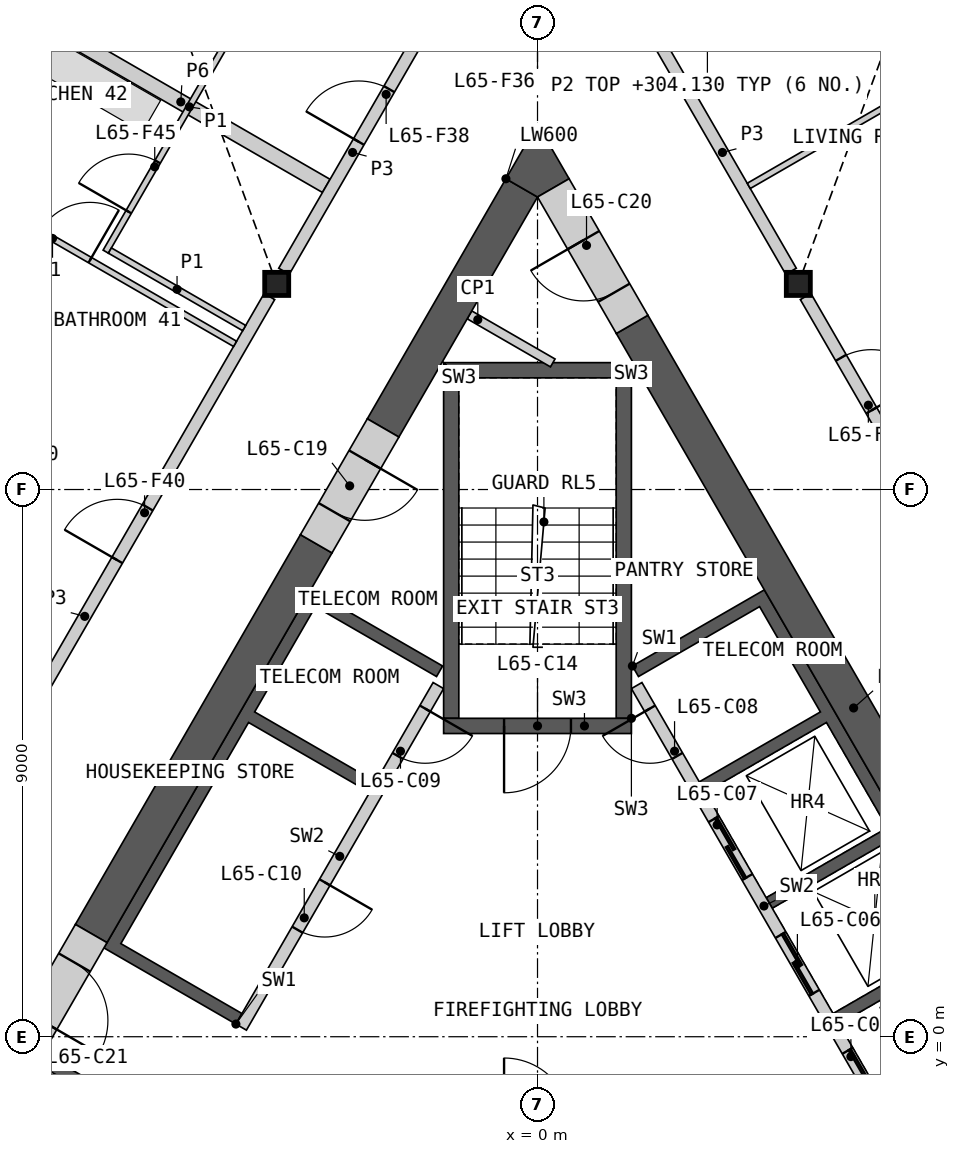
"""IFC4 building model, lengths in metres.
Left out: names, types, materials, properties, quantities, classifications, styles, units other than length and angle.
Written with IfcOpenShell. Run it as: python <this file> out.ifc"""

import sys

from ifc_helpers import new_model, si_unit, direction, frame, frame_2d, origin, origin_2d, place, context, subcontext, project, spatial, polyline, rectangle, i_section, outline, extrude, element, fill, save


model = new_model("IFC4")
c1 = context("Model", 3, precision=1e-05, world=origin(), true_north=direction((0.0, 1.0)))
c2 = subcontext(c1, "Body", "Model", "MODEL_VIEW")
j1 = project(units=[si_unit("LENGTHUNIT", "METRE"), si_unit("PLANEANGLEUNIT", "RADIAN")], contexts=[c1])
p1 = place(None, origin())
s1 = spatial("IfcSite", under=j1, at=p1, CompositionType="ELEMENT")
p2 = place(p1, origin())
s2 = spatial("IfcBuilding", under=s1, at=p2, CompositionType="ELEMENT")
p3 = place(p2, frame((0.0, 0.0, 301.8)))
s3 = spatial("IfcBuildingStorey", under=s2, at=p3, CompositionType="ELEMENT", Elevation=301.8)
for number, where, z_axis, x_axis in (
    (1, (-4.289, 12.382, 0.0), (0.0, 0.0, 1.0), (1.0, 0.0, 0.0)),
    (2, (4.289, 12.382, 0.0), (0.0, 0.0, 1.0), (1.0, 0.0, 0.0)),
):
    element("IfcColumn", number, at=place(p3, frame(where, z_axis=z_axis, x_axis=x_axis)), inside=s3, PredefinedType="COLUMN", context=c2, shape_type="SweptSolid", body=[
        extrude(i_section(OverallWidth=0.396, OverallDepth=0.381, WebThickness=0.019, FlangeThickness=0.03, at=origin_2d()), origin(), (0.0, 0.0, 1.0), 3.4),
    ])
p4 = place(p3, origin())
e3 = element("IfcWall", 3, at=p4, inside=s3, PredefinedType="SHEAR", context=c2, shape_type="SweptSolid", body=[
    extrude(outline(polyline([(1.561, 6.097), (3.731, 7.35), (8.231, -0.444), (6.061, -1.697), (5.96, -1.524), (7.952, -0.374), (6.952, 1.358), (4.96, 0.208), (4.861, 0.381), (6.852, 1.531), (5.852, 3.263), (3.861, 2.113), (3.76, 2.287), (5.752, 3.437), (4.752, 5.169), (2.76, 4.019), (2.66, 4.192), (4.652, 5.342), (3.652, 7.074), (1.66, 5.924), (1.561, 6.097)])), origin(), (0.0, 0.0, 1.0), 3.1),
])
p5 = place(p3, frame((5.817, -1.476, 0.0), z_axis=(0.0, 0.0, 1.0), x_axis=(-0.500002616675, 0.866023893041, 0.0)))
e4 = element("IfcWall", 4, at=p5, inside=s3, PredefinedType="SOLIDWALL", context=c2, shape_type="SweptSolid", body=[
    extrude(rectangle(XDim=8.373, YDim=0.2, at=frame_2d((4.187, 0.0))), origin(), (0.0, 0.0, 1.0), 3.1),
])
p6 = place(p5, frame((0.337, 0.0, 0.0)))
e5 = element("IfcOpeningElement", 5, at=p6, cuts=e4, PredefinedType="OPENING", context=c2, shape_type="SweptSolid", body=[
    extrude(rectangle(XDim=1.1, YDim=2.1, at=frame_2d((0.55, 1.05))), frame((0.0, 0.11, 0.0), z_axis=(0.0, -1.0, 0.0), x_axis=(1.0, 0.0, 0.0)), (0.0, 0.0, 1.0), 0.22),
])
p7 = place(p5, frame((2.537, 0.0, 0.0)))
e6 = element("IfcOpeningElement", 6, at=p7, cuts=e4, PredefinedType="OPENING", context=c2, shape_type="SweptSolid", body=[
    extrude(rectangle(XDim=1.1, YDim=2.1, at=frame_2d((0.55, 1.05))), frame((0.0, 0.11, 0.0), z_axis=(0.0, -1.0, 0.0), x_axis=(1.0, 0.0, 0.0)), (0.0, 0.0, 1.0), 0.22),
])
p8 = place(p5, frame((4.737, 0.0, 0.0)))
e7 = element("IfcOpeningElement", 7, at=p8, cuts=e4, PredefinedType="OPENING", context=c2, shape_type="SweptSolid", body=[
    extrude(rectangle(XDim=1.1, YDim=2.1, at=frame_2d((0.55, 1.05))), frame((0.0, 0.11, 0.0), z_axis=(0.0, -1.0, 0.0), x_axis=(1.0, 0.0, 0.0)), (0.0, 0.0, 1.0), 0.22),
])
p9 = place(p5, frame((7.037, 0.0, 0.0)))
e8 = element("IfcOpeningElement", 8, at=p9, cuts=e4, PredefinedType="OPENING", context=c2, shape_type="SweptSolid", body=[
    extrude(rectangle(XDim=0.9, YDim=2.1, at=frame_2d((0.45, 1.05))), frame((0.0, 0.11, 0.0), z_axis=(0.0, -1.0, 0.0), x_axis=(1.0, 0.0, 0.0)), (0.0, 0.0, 1.0), 0.22),
])
p10 = place(p3, origin())
e9 = element("IfcWall", 9, at=p10, inside=s3, PredefinedType="SHEAR", context=c2, shape_type="SweptSolid", body=[
    extrude(outline(polyline([(-6.061, -1.697), (-8.231, -0.444), (-8.131, -0.271), (-5.96, -1.524), (-6.061, -1.697)])), origin(), (0.0, 0.0, 1.0), 3.1),
])
p11 = place(p3, origin())
e10 = element("IfcWall", 10, at=p11, inside=s3, PredefinedType="SHEAR", context=c2, shape_type="SweptSolid", body=[
    extrude(outline(polyline([(-4.96, 0.208), (-7.131, 1.461), (-3.731, 7.35), (-1.561, 6.097), (-1.66, 5.924), (-3.652, 7.074), (-4.652, 5.342), (-2.66, 4.192), (-2.76, 4.019), (-4.752, 5.169), (-6.852, 1.531), (-4.861, 0.381), (-4.96, 0.208)])), origin(), (0.0, 0.0, 1.0), 3.1),
])
p12 = place(p3, frame((-1.631, 5.776, 0.0), z_axis=(0.0, 0.0, 1.0), x_axis=(-0.499992876559, -0.866029516466, 0.0)))
e11 = element("IfcWall", 11, at=p12, inside=s3, PredefinedType="SOLIDWALL", context=c2, shape_type="SweptSolid", body=[
    extrude(rectangle(XDim=6.486, YDim=0.2, at=frame_2d((3.243, 0.0))), origin(), (0.0, 0.0, 1.0), 3.1),
])
p13 = place(p12, frame((0.437, 0.0, 0.0)))
e12 = element("IfcOpeningElement", 12, at=p13, cuts=e11, PredefinedType="OPENING", context=c2, shape_type="SweptSolid", body=[
    extrude(rectangle(XDim=0.9, YDim=2.1, at=frame_2d((0.45, 1.05))), frame((0.0, 0.11, 0.0), z_axis=(0.0, -1.0, 0.0), x_axis=(1.0, 0.0, 0.0)), (0.0, 0.0, 1.0), 0.22),
])
p14 = place(p12, frame((3.737, 0.0, 0.0)))
e13 = element("IfcOpeningElement", 13, at=p14, cuts=e11, PredefinedType="OPENING", context=c2, shape_type="SweptSolid", body=[
    extrude(rectangle(XDim=0.9, YDim=2.1, at=frame_2d((0.45, 1.05))), frame((0.0, 0.11, 0.0), z_axis=(0.0, -1.0, 0.0), x_axis=(1.0, 0.0, 0.0)), (0.0, 0.0, 1.0), 0.22),
])
p15 = place(p3, origin())
e14 = element("IfcWall", 14, at=p15, inside=s3, PredefinedType="SHEAR", context=c2, shape_type="SweptSolid", body=[
    extrude(outline(polyline([(1.544, 5.237), (1.544, 11.087), (1.294, 10.837), (1.294, 5.237), (1.544, 5.237)])), origin(), (0.0, 0.0, 1.0), 3.1),
])
p16 = place(p3, origin())
e15 = element("IfcWall", 15, at=p16, inside=s3, PredefinedType="SHEAR", context=c2, shape_type="SweptSolid", body=[
    extrude(outline(polyline([(1.544, 11.087), (-1.544, 11.087), (-1.294, 10.837), (1.294, 10.837), (1.544, 11.087)])), origin(), (0.0, 0.0, 1.0), 3.1),
])
p17 = place(p3, origin())
e16 = element("IfcWall", 16, at=p17, inside=s3, PredefinedType="SHEAR", context=c2, shape_type="SweptSolid", body=[
    extrude(outline(polyline([(-1.294, 10.837), (-1.544, 11.087), (-1.544, 5.237), (-1.294, 5.237), (-1.294, 10.837)])), origin(), (0.0, 0.0, 1.0), 3.1),
])
p18 = place(p3, frame((1.544, 5.112, 0.0), z_axis=(0.0, 0.0, 1.0), x_axis=(-1.0, 0.0, 0.0)))
e17 = element("IfcWall", 17, at=p18, inside=s3, PredefinedType="SHEAR", context=c2, shape_type="SweptSolid", body=[
    extrude(rectangle(XDim=3.088, YDim=0.25, at=frame_2d((1.544, 0.0))), origin(), (0.0, 0.0, 1.0), 3.1),
])
p19 = place(p18, frame((0.994, 0.0, 0.0)))
e18 = element("IfcOpeningElement", 18, at=p19, cuts=e17, PredefinedType="OPENING", context=c2, shape_type="SweptSolid", body=[
    extrude(rectangle(XDim=1.1, YDim=2.1, at=frame_2d((0.55, 1.05))), frame((0.0, 0.135, 0.0), z_axis=(0.0, -1.0, 0.0), x_axis=(1.0, 0.0, 0.0)), (0.0, 0.0, 1.0), 0.27),
])
p20 = place(p3, frame((-1.119, 11.873, 0.0), z_axis=(0.0, 0.0, 1.0), x_axis=(0.865992812752, -0.500056445075, 0.0)))
e19 = element("IfcWall", 19, at=p20, inside=s3, PredefinedType="PARTITIONING", context=c2, shape_type="SweptSolid", body=[
    extrude(rectangle(XDim=1.582, YDim=0.15, at=frame_2d((0.791, 0.0))), origin(), (0.0, 0.0, 1.0), 3.1),
])
p21 = place(p3, frame((8.841, -0.902, 0.0), z_axis=(0.0, 0.0, 1.0), x_axis=(-0.499995618375, 0.866027933502, 0.0)))
e20 = element("IfcWall", 20, at=p21, inside=s3, PredefinedType="SHEAR", context=c2, shape_type="SweptSolid", body=[
    extrude(rectangle(XDim=14.571, YDim=0.6, at=frame_2d((7.285, 0.0))), origin(), (0.0, 0.0, 1.0), 3.1),
])
p22 = place(p3, frame((-3.639, 8.107, 0.0), z_axis=(0.0, 0.0, 1.0), x_axis=(-0.49999180351, -0.866030135978, 0.0)))
e21 = element("IfcWall", 21, at=p22, inside=s3, PredefinedType="SHEAR", context=c2, shape_type="SweptSolid", body=[
    extrude(rectangle(XDim=7.401, YDim=0.6, at=frame_2d((3.701, 0.0))), origin(), (0.0, 0.0, 1.0), 3.1),
])
p23 = place(p3, frame((-0.26, 13.961, 0.0), z_axis=(0.0, 0.0, 1.0), x_axis=(-0.499980485389, -0.866036670257, 0.0)))
e22 = element("IfcWall", 22, at=p23, inside=s3, PredefinedType="SHEAR", context=c2, shape_type="SweptSolid", body=[
    extrude(rectangle(XDim=4.559, YDim=0.6, at=frame_2d((2.28, 0.0))), origin(), (0.0, 0.0, 1.0), 3.1),
])
p24 = place(p3, origin())
e23 = element("IfcWall", 23, at=p24, inside=s3, PredefinedType="SHEAR", context=c2, shape_type="SweptSolid", body=[
    extrude(outline(polyline([(-0.52, 14.111), (0.0, 15.011), (0.52, 14.111), (0.0, 13.811), (-0.52, 14.111)])), origin(), (0.0, 0.0, 1.0), 3.1),
])
p25 = place(p3, frame((-2.539, 10.013, 0.0), z_axis=(0.0, 0.0, 1.0), x_axis=(-0.50002983664, -0.866008176907, 0.0)))
e24 = element("IfcWall", 24, at=p25, inside=s3, PredefinedType="SHEAR", context=c2, shape_type="SweptSolid", body=[
    extrude(rectangle(XDim=2.2, YDim=0.6, at=frame_2d((1.1, 0.0))), origin(), (0.0, 0.0, 1.0), 3.1),
])
p26 = place(p25, frame((0.6, 0.0, 0.0)))
e25 = element("IfcOpeningElement", 25, at=p26, cuts=e24, PredefinedType="OPENING", context=c2, shape_type="SweptSolid", body=[
    extrude(rectangle(XDim=1.0, YDim=2.1, at=frame_2d((0.5, 1.05))), frame((0.0, 0.31, 0.0), z_axis=(0.0, -1.0, 0.0), x_axis=(1.0, 0.0, 0.0)), (0.0, 0.0, 1.0), 0.62),
])
p27 = place(p3, frame((1.556, 11.716, 0.0), z_axis=(0.0, 0.0, 1.0), x_axis=(-0.500018667571, 0.866014625789, 0.0)))
e26 = element("IfcWall", 26, at=p27, inside=s3, PredefinedType="SHEAR", context=c2, shape_type="SweptSolid", body=[
    extrude(rectangle(XDim=2.592, YDim=0.6, at=frame_2d((1.296, 0.0))), origin(), (0.0, 0.0, 1.0), 3.1),
])
p28 = place(p27, frame((0.6, 0.0, 0.0)))
e27 = element("IfcOpeningElement", 27, at=p28, cuts=e26, PredefinedType="OPENING", context=c2, shape_type="SweptSolid", body=[
    extrude(rectangle(XDim=1.0, YDim=2.1, at=frame_2d((0.5, 1.05))), frame((0.0, 0.31, 0.0), z_axis=(0.0, -1.0, 0.0), x_axis=(1.0, 0.0, 0.0)), (0.0, 0.0, 1.0), 0.62),
])
p29 = place(p3, frame((-7.34, 1.698, 0.0), z_axis=(0.0, 0.0, 1.0), x_axis=(-0.50002983664, -0.866008176907, 0.0)))
e28 = element("IfcWall", 28, at=p29, inside=s3, PredefinedType="SHEAR", context=c2, shape_type="SweptSolid", body=[
    extrude(rectangle(XDim=2.2, YDim=0.6, at=frame_2d((1.1, 0.0))), origin(), (0.0, 0.0, 1.0), 3.1),
])
p30 = place(p29, frame((0.55, 0.0, 0.0)))
e29 = element("IfcOpeningElement", 29, at=p30, cuts=e28, PredefinedType="OPENING", context=c2, shape_type="SweptSolid", body=[
    extrude(rectangle(XDim=1.1, YDim=2.1, at=frame_2d((0.55, 1.05))), frame((0.0, 0.31, 0.0), z_axis=(0.0, -1.0, 0.0), x_axis=(1.0, 0.0, 0.0)), (0.0, 0.0, 1.0), 0.62),
])
p31 = place(p3, frame((4.409, 12.174, 0.0), z_axis=(0.0, 0.0, 1.0), x_axis=(0.499984266882, -0.866034487114, 0.0)))
e30 = element("IfcWall", 30, at=p31, inside=s3, PredefinedType="PARTITIONING", context=c2, shape_type="SweptSolid", body=[
    extrude(rectangle(XDim=8.099, YDim=0.2, at=frame_2d((4.049, 0.0))), origin(), (0.0, 0.0, 1.0), 3.1),
])
p32 = place(p31, frame((5.123, 0.0, 0.0)))
e31 = element("IfcOpeningElement", 31, at=p32, cuts=e30, PredefinedType="OPENING", context=c2, shape_type="SweptSolid", body=[
    extrude(rectangle(XDim=1.0, YDim=2.1, at=frame_2d((0.5, 1.05))), frame((0.0, 0.11, 0.0), z_axis=(0.0, -1.0, 0.0), x_axis=(1.0, 0.0, 0.0)), (0.0, 0.0, 1.0), 0.22),
])
p33 = place(p31, frame((1.164, 0.0, 0.0)))
e32 = element("IfcOpeningElement", 32, at=p33, cuts=e30, PredefinedType="OPENING", context=c2, shape_type="SweptSolid", body=[
    extrude(rectangle(XDim=1.0, YDim=2.1, at=frame_2d((0.5, 1.05))), frame((0.0, 0.11, 0.0), z_axis=(0.0, -1.0, 0.0), x_axis=(1.0, 0.0, 0.0)), (0.0, 0.0, 1.0), 0.22),
])
p34 = place(p3, frame((-8.458, 5.16, 0.0), z_axis=(0.0, 0.0, 1.0), x_axis=(0.499984266882, 0.866034487114, 0.0)))
e33 = element("IfcWall", 33, at=p34, inside=s3, PredefinedType="PARTITIONING", context=c2, shape_type="SweptSolid", body=[
    extrude(rectangle(XDim=8.099, YDim=0.2, at=frame_2d((4.049, 0.0))), origin(), (0.0, 0.0, 1.0), 3.1),
])
p35 = place(p34, frame((3.093, 0.0, 0.0)))
e34 = element("IfcOpeningElement", 34, at=p35, cuts=e33, PredefinedType="OPENING", context=c2, shape_type="SweptSolid", body=[
    extrude(rectangle(XDim=1.0, YDim=2.1, at=frame_2d((0.5, 1.05))), frame((0.0, 0.11, 0.0), z_axis=(0.0, -1.0, 0.0), x_axis=(1.0, 0.0, 0.0)), (0.0, 0.0, 1.0), 0.22),
])
p36 = place(p3, frame((-8.259, 16.756, 0.0), z_axis=(0.0, 0.0, 1.0), x_axis=(0.866023692682, -0.500002963705, 0.0)))
e35 = element("IfcWall", 35, at=p36, inside=s3, PredefinedType="PARTITIONING", context=c2, shape_type="SweptSolid", body=[
    extrude(rectangle(XDim=5.525, YDim=0.25, at=frame_2d((2.762, 0.0))), origin(), (0.0, 0.0, 1.0), 2.33),
])
p37 = place(p3, frame((1.913, 16.498, 0.0), z_axis=(0.0, 0.0, 1.0), x_axis=(0.499950370306, -0.866054055606, 0.0)))
e36 = element("IfcWall", 36, at=p37, inside=s3, PredefinedType="PARTITIONING", context=c2, shape_type="SweptSolid", body=[
    extrude(rectangle(XDim=4.513, YDim=0.2, at=frame_2d((2.256, 0.0))), origin(), (0.0, 0.0, 1.0), 3.1),
])
p38 = place(p3, frame((-4.169, 12.59, 0.0), z_axis=(0.0, 0.0, 1.0), x_axis=(0.499950370306, 0.866054055606, 0.0)))
e37 = element("IfcWall", 37, at=p38, inside=s3, PredefinedType="PARTITIONING", context=c2, shape_type="SweptSolid", body=[
    extrude(rectangle(XDim=4.513, YDim=0.2, at=frame_2d((2.256, 0.0))), origin(), (0.0, 0.0, 1.0), 3.1),
])
p39 = place(p38, frame((2.459, 0.0, 0.0)))
e38 = element("IfcOpeningElement", 38, at=p39, cuts=e37, PredefinedType="OPENING", context=c2, shape_type="SweptSolid", body=[
    extrude(rectangle(XDim=1.0, YDim=2.1, at=frame_2d((0.5, 1.05))), frame((0.0, 0.11, 0.0), z_axis=(0.0, -1.0, 0.0), x_axis=(1.0, 0.0, 0.0)), (0.0, 0.0, 1.0), 0.22),
])
p40 = place(p3, frame((3.474, 13.994, 0.0), z_axis=(0.0, 0.0, 1.0), x_axis=(0.866032424046, 0.499987840353, 0.0)))
e39 = element("IfcWall", 39, at=p40, inside=s3, PredefinedType="PARTITIONING", context=c2, shape_type="SweptSolid", body=[
    extrude(rectangle(XDim=12.635, YDim=0.1, at=frame_2d((6.317, 0.0))), origin(), (0.0, 0.0, 1.0), 2.33),
])
p41 = place(p40, frame((8.714, 0.0, 0.0)))
e40 = element("IfcOpeningElement", 40, at=p41, cuts=e39, PredefinedType="OPENING", context=c2, shape_type="SweptSolid", body=[
    extrude(rectangle(XDim=0.95, YDim=2.1, at=frame_2d((0.475, 1.05))), frame((0.0, 0.06, 0.0), z_axis=(0.0, -1.0, 0.0), x_axis=(1.0, 0.0, 0.0)), (0.0, 0.0, 1.0), 0.12),
])
p42 = place(p3, frame((-9.787, 14.174, 0.0), z_axis=(0.0, 0.0, 1.0), x_axis=(0.866031222068, -0.499989922303, 0.0)))
e41 = element("IfcWall", 41, at=p42, inside=s3, PredefinedType="PARTITIONING", context=c2, shape_type="SweptSolid", body=[
    extrude(rectangle(XDim=5.557, YDim=0.1, at=frame_2d((2.779, 0.0))), origin(), (0.0, 0.0, 1.0), 2.33),
])
p43 = place(p42, frame((1.853, 0.0, 0.0)))
e42 = element("IfcOpeningElement", 42, at=p43, cuts=e41, PredefinedType="OPENING", context=c2, shape_type="SweptSolid", body=[
    extrude(rectangle(XDim=0.95, YDim=2.1, at=frame_2d((0.475, 1.05))), frame((0.0, 0.06, 0.0), z_axis=(0.0, -1.0, 0.0), x_axis=(1.0, 0.0, 0.0)), (0.0, 0.0, 1.0), 0.12),
])
p44 = place(p3, frame((-7.101, 12.912, 0.0), z_axis=(0.0, 0.0, 1.0), x_axis=(0.499996545922, 0.866027397988, 0.0)))
e43 = element("IfcWall", 43, at=p44, inside=s3, PredefinedType="PARTITIONING", context=c2, shape_type="SweptSolid", body=[
    extrude(rectangle(XDim=5.5, YDim=0.1, at=frame_2d((2.75, 0.0))), origin(), (0.0, 0.0, 1.0), 2.33),
])
p45 = place(p44, frame((0.756, 0.0, 0.0)))
e44 = element("IfcOpeningElement", 44, at=p45, cuts=e43, PredefinedType="OPENING", context=c2, shape_type="SweptSolid", body=[
    extrude(rectangle(XDim=0.95, YDim=2.1, at=frame_2d((0.475, 1.05))), frame((0.0, 0.06, 0.0), z_axis=(0.0, -1.0, 0.0), x_axis=(1.0, 0.0, 0.0)), (0.0, 0.0, 1.0), 0.12),
])
p46 = place(p3, frame((-7.032, 12.93, 0.0), z_axis=(0.0, 0.0, 1.0), x_axis=(0.866030925526, -0.499990435942, 0.0)))
e45 = element("IfcWall", 45, at=p46, inside=s3, PredefinedType="PARTITIONING", context=c2, shape_type="SweptSolid", body=[
    extrude(rectangle(XDim=2.55, YDim=0.1, at=frame_2d((1.275, 0.0))), origin(), (0.0, 0.0, 1.0), 2.33),
])
p47 = place(p6, origin())
e46 = element("IfcDoor", 46, at=p47, inside=s3, OperationType="SLIDING_TO_LEFT", PredefinedType="DOOR", context=c2, shape_type="SweptSolid", body=[
    extrude(rectangle(XDim=1.1, YDim=2.1, at=frame_2d((0.55, 1.05))), frame((0.0, 0.025, 0.0), z_axis=(0.0, -1.0, 0.0), x_axis=(1.0, 0.0, 0.0)), (0.0, 0.0, 1.0), 0.05),
])
fill(e5, e46)
p48 = place(p7, origin())
e47 = element("IfcDoor", 47, at=p48, inside=s3, OperationType="SLIDING_TO_LEFT", PredefinedType="DOOR", context=c2, shape_type="SweptSolid", body=[
    extrude(rectangle(XDim=1.1, YDim=2.1, at=frame_2d((0.55, 1.05))), frame((0.0, 0.025, 0.0), z_axis=(0.0, -1.0, 0.0), x_axis=(1.0, 0.0, 0.0)), (0.0, 0.0, 1.0), 0.05),
])
fill(e6, e47)
p49 = place(p8, origin())
e48 = element("IfcDoor", 48, at=p49, inside=s3, OperationType="SLIDING_TO_LEFT", PredefinedType="DOOR", context=c2, shape_type="SweptSolid", body=[
    extrude(rectangle(XDim=1.1, YDim=2.1, at=frame_2d((0.55, 1.05))), frame((0.0, 0.025, 0.0), z_axis=(0.0, -1.0, 0.0), x_axis=(1.0, 0.0, 0.0)), (0.0, 0.0, 1.0), 0.05),
])
fill(e7, e48)
p50 = place(p9, origin())
e49 = element("IfcDoor", 49, at=p50, inside=s3, OperationType="SINGLE_SWING_RIGHT", PredefinedType="DOOR", context=c2, shape_type="SweptSolid", body=[
    extrude(rectangle(XDim=0.9, YDim=2.1, at=frame_2d((0.45, 1.05))), frame((0.0, 0.025, 0.0), z_axis=(0.0, -1.0, 0.0), x_axis=(1.0, 0.0, 0.0)), (0.0, 0.0, 1.0), 0.05),
])
fill(e8, e49)
p51 = place(p13, origin())
e50 = element("IfcDoor", 50, at=p51, inside=s3, OperationType="SINGLE_SWING_LEFT", PredefinedType="DOOR", context=c2, shape_type="SweptSolid", body=[
    extrude(rectangle(XDim=0.9, YDim=2.1, at=frame_2d((0.45, 1.05))), frame((0.0, 0.025, 0.0), z_axis=(0.0, -1.0, 0.0), x_axis=(1.0, 0.0, 0.0)), (0.0, 0.0, 1.0), 0.05),
])
fill(e12, e50)
p52 = place(p14, origin())
e51 = element("IfcDoor", 51, at=p52, inside=s3, OperationType="SINGLE_SWING_LEFT", PredefinedType="DOOR", context=c2, shape_type="SweptSolid", body=[
    extrude(rectangle(XDim=0.9, YDim=2.1, at=frame_2d((0.45, 1.05))), frame((0.0, 0.025, 0.0), z_axis=(0.0, -1.0, 0.0), x_axis=(1.0, 0.0, 0.0)), (0.0, 0.0, 1.0), 0.05),
])
fill(e13, e51)
p53 = place(p19, origin())
e52 = element("IfcDoor", 52, at=p53, inside=s3, OperationType="SINGLE_SWING_RIGHT", PredefinedType="DOOR", context=c2, shape_type="SweptSolid", body=[
    extrude(rectangle(XDim=1.1, YDim=2.1, at=frame_2d((0.55, 1.05))), frame((0.0, 0.025, 0.0), z_axis=(0.0, -1.0, 0.0), x_axis=(1.0, 0.0, 0.0)), (0.0, 0.0, 1.0), 0.05),
])
fill(e18, e52)
p54 = place(p26, origin())
e53 = element("IfcDoor", 53, at=p54, inside=s3, OperationType="SINGLE_SWING_LEFT", PredefinedType="DOOR", context=c2, shape_type="SweptSolid", body=[
    extrude(rectangle(XDim=1.0, YDim=2.1, at=frame_2d((0.5, 1.05))), frame((0.0, 0.055, 0.0), z_axis=(0.0, -1.0, 0.0), x_axis=(1.0, 0.0, 0.0)), (0.0, 0.0, 1.0), 0.05),
])
fill(e25, e53)
p55 = place(p28, origin())
e54 = element("IfcDoor", 54, at=p55, inside=s3, OperationType="SINGLE_SWING_RIGHT", PredefinedType="DOOR", context=c2, shape_type="SweptSolid", body=[
    extrude(rectangle(XDim=1.0, YDim=2.1, at=frame_2d((0.5, 1.05))), frame((0.0, 0.055, 0.0), z_axis=(0.0, -1.0, 0.0), x_axis=(1.0, 0.0, 0.0)), (0.0, 0.0, 1.0), 0.05),
])
fill(e27, e54)
p56 = place(p30, origin())
e55 = element("IfcDoor", 55, at=p56, inside=s3, OperationType="SINGLE_SWING_RIGHT", PredefinedType="DOOR", context=c2, shape_type="SweptSolid", body=[
    extrude(rectangle(XDim=1.1, YDim=2.1, at=frame_2d((0.55, 1.05))), frame((0.0, 0.055, 0.0), z_axis=(0.0, -1.0, 0.0), x_axis=(1.0, 0.0, 0.0)), (0.0, 0.0, 1.0), 0.05),
])
fill(e29, e55)
p57 = place(p33, origin())
e56 = element("IfcDoor", 56, at=p57, inside=s3, OperationType="SINGLE_SWING_RIGHT", PredefinedType="DOOR", context=c2, shape_type="SweptSolid", body=[
    extrude(rectangle(XDim=1.0, YDim=2.1, at=frame_2d((0.5, 1.05))), frame((0.0, 0.025, 0.0), z_axis=(0.0, -1.0, 0.0), x_axis=(1.0, 0.0, 0.0)), (0.0, 0.0, 1.0), 0.05),
])
fill(e32, e56)
p58 = place(p39, origin())
e57 = element("IfcDoor", 57, at=p58, inside=s3, OperationType="SINGLE_SWING_LEFT", PredefinedType="DOOR", context=c2, shape_type="SweptSolid", body=[
    extrude(rectangle(XDim=1.0, YDim=2.1, at=frame_2d((0.5, 1.05))), frame((0.0, 0.025, 0.0), z_axis=(0.0, -1.0, 0.0), x_axis=(1.0, 0.0, 0.0)), (0.0, 0.0, 1.0), 0.05),
])
fill(e38, e57)
p59 = place(p35, origin())
e58 = element("IfcDoor", 58, at=p59, inside=s3, OperationType="SINGLE_SWING_LEFT", PredefinedType="DOOR", context=c2, shape_type="SweptSolid", body=[
    extrude(rectangle(XDim=1.0, YDim=2.1, at=frame_2d((0.5, 1.05))), frame((0.0, 0.025, 0.0), z_axis=(0.0, -1.0, 0.0), x_axis=(1.0, 0.0, 0.0)), (0.0, 0.0, 1.0), 0.05),
])
fill(e34, e58)
p60 = place(p43, origin())
e59 = element("IfcDoor", 59, at=p60, inside=s3, OperationType="SINGLE_SWING_RIGHT", PredefinedType="DOOR", context=c2, shape_type="SweptSolid", body=[
    extrude(rectangle(XDim=0.95, YDim=2.1, at=frame_2d((0.475, 1.05))), frame((0.0, 0.025, 0.0), z_axis=(0.0, -1.0, 0.0), x_axis=(1.0, 0.0, 0.0)), (0.0, 0.0, 1.0), 0.05),
])
fill(e42, e59)
p61 = place(p45, origin())
e60 = element("IfcDoor", 60, at=p61, inside=s3, OperationType="SINGLE_SWING_LEFT", PredefinedType="DOOR", context=c2, shape_type="SweptSolid", body=[
    extrude(rectangle(XDim=0.95, YDim=2.1, at=frame_2d((0.475, 1.05))), frame((0.0, 0.025, 0.0), z_axis=(0.0, -1.0, 0.0), x_axis=(1.0, 0.0, 0.0)), (0.0, 0.0, 1.0), 0.05),
])
fill(e44, e60)
save(model, sys.argv[1])
